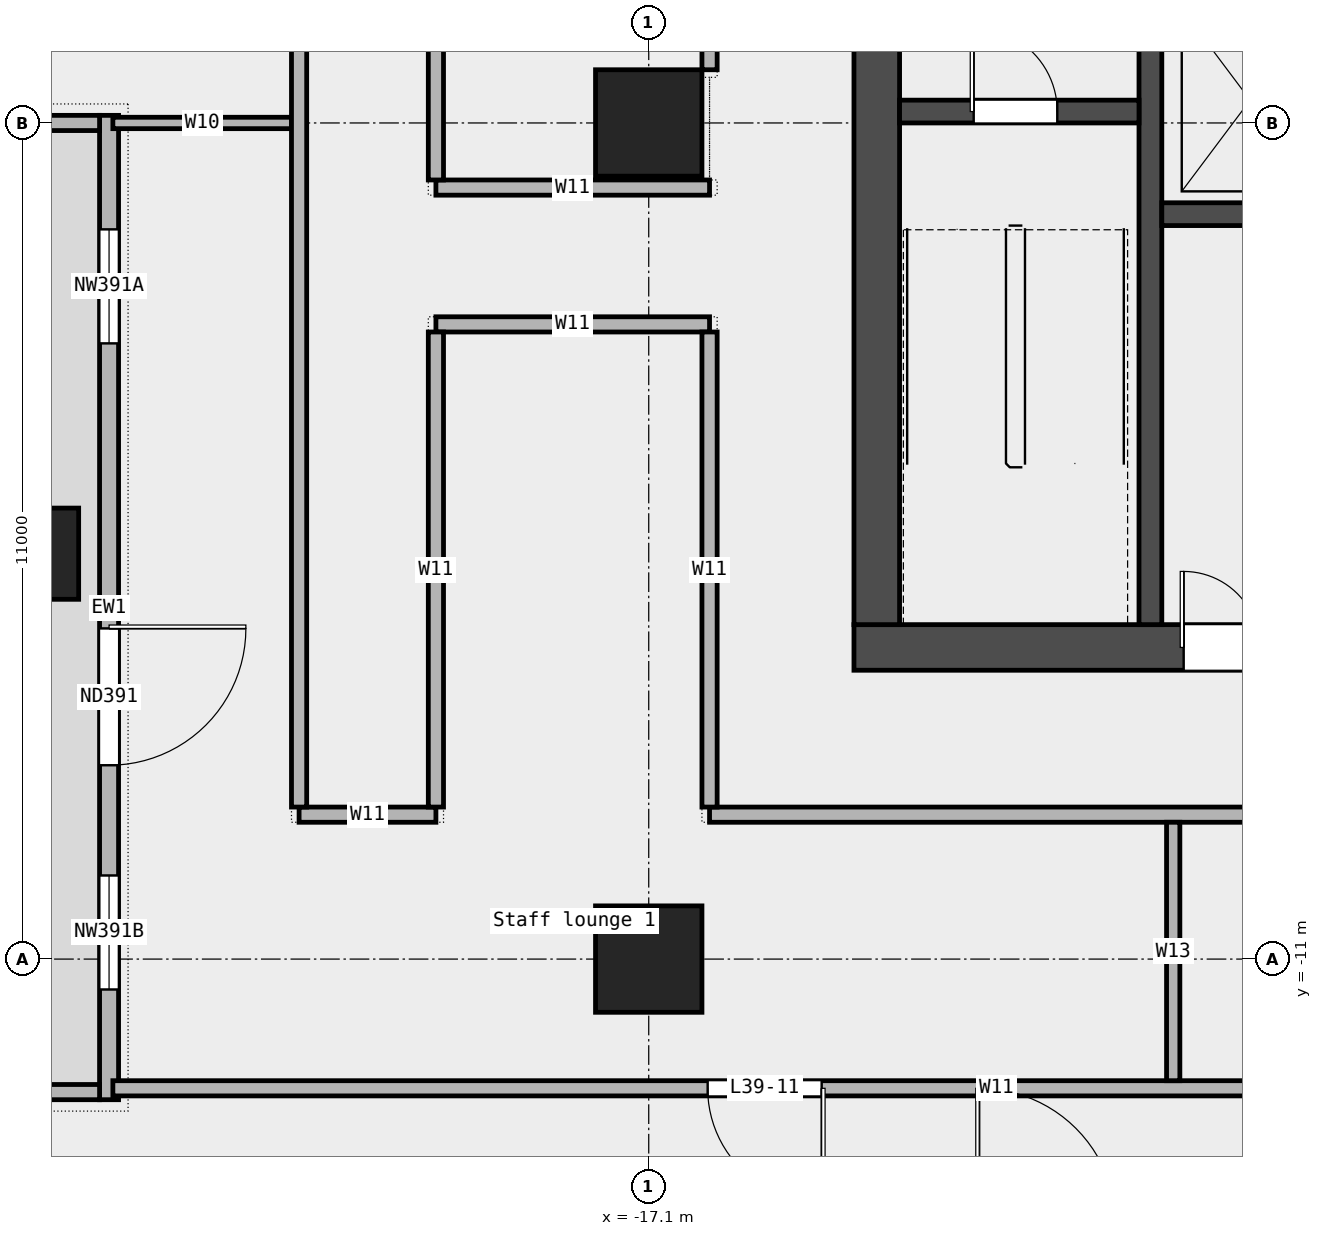
"""IFC4 building model, lengths in metres.
Left out: names, types, materials, properties, quantities, classifications, styles, units other than length and angle.
Written with IfcOpenShell. Run it as: python <this file> out.ifc"""

import sys

from ifc_helpers import new_model, si_unit, direction, frame, frame_2d, origin, origin_2d, place, context, subcontext, project, spatial, rectangle, extrude, element, fill, save


model = new_model("IFC4")
c1 = context("Model", 3, precision=1e-05, world=origin(), true_north=direction((0.0, 1.0)))
c2 = subcontext(c1, "Body", "Model", "MODEL_VIEW")
j1 = project(units=[si_unit("LENGTHUNIT", "METRE"), si_unit("PLANEANGLEUNIT", "RADIAN")], contexts=[c1])
p1 = place(None, origin())
s1 = spatial("IfcSite", under=j1, at=p1, CompositionType="ELEMENT")
p2 = place(p1, origin())
s2 = spatial("IfcBuilding", under=s1, at=p2, CompositionType="ELEMENT")
p3 = place(p2, frame((0.0, 0.0, 189.0)))
s3 = spatial("IfcBuildingStorey", under=s2, at=p3, CompositionType="ELEMENT", Elevation=189.0)
p4 = place(p3, frame((-25.2, -5.667, 0.0), z_axis=(0.0, 0.0, 1.0), x_axis=(1.0, 0.0, 0.0)))
e1 = element("IfcColumn", 1, at=p4, inside=s3, PredefinedType="COLUMN", context=c2, shape_type="SweptSolid", body=[
    extrude(rectangle(XDim=1.2, YDim=1.2, at=origin_2d()), origin(), (0.0, 0.0, 1.0), 3.6),
])
for number, where, z_axis, x_axis in (
    (2, (-17.1, -11.0, 0.0), (0.0, 0.0, 1.0), (1.0, 0.0, 0.0)),
    (3, (-17.1, 0.0, 0.0), (0.0, 0.0, 1.0), (1.0, 0.0, 0.0)),
):
    element("IfcColumn", number, at=place(p3, frame(where, z_axis=z_axis, x_axis=x_axis)), inside=s3, PredefinedType="COLUMN", context=c2, shape_type="SweptSolid", body=[
        extrude(rectangle(XDim=1.4, YDim=1.4, at=origin_2d()), origin(), (0.0, 0.0, 1.0), 3.6),
    ])
p5 = place(p3, frame((-24.2, 0.1, 0.0), z_axis=(0.0, 0.0, 1.0), x_axis=(0.0, -1.0, 0.0)))
e4 = element("IfcWall", 4, at=p5, inside=s3, PredefinedType="STANDARD", context=c2, shape_type="SweptSolid", body=[
    extrude(rectangle(XDim=12.95, YDim=0.25, at=frame_2d((6.475, 0.0))), origin(), (0.0, 0.0, 1.0), 3.6),
])
p6 = place(p5, frame((1.5, 0.0, 0.45)))
e5 = element("IfcOpeningElement", 5, at=p6, cuts=e4, PredefinedType="OPENING", context=c2, shape_type="SweptSolid", body=[
    extrude(rectangle(XDim=1.5, YDim=2.4, at=frame_2d((0.75, 1.2))), frame((0.0, 0.137, 0.0), z_axis=(0.0, -1.0, 0.0), x_axis=(1.0, 0.0, 0.0)), (0.0, 0.0, 1.0), 0.274),
])
p7 = place(p5, frame((6.75, 0.0, 0.0)))
e6 = element("IfcOpeningElement", 6, at=p7, cuts=e4, PredefinedType="OPENING", context=c2, shape_type="SweptSolid", body=[
    extrude(rectangle(XDim=1.8, YDim=2.4, at=frame_2d((0.9, 1.2))), frame((0.0, 0.137, 0.0), z_axis=(0.0, -1.0, 0.0), x_axis=(1.0, 0.0, 0.0)), (0.0, 0.0, 1.0), 0.274),
])
p8 = place(p5, frame((10.0, 0.0, 0.45)))
e7 = element("IfcOpeningElement", 7, at=p8, cuts=e4, PredefinedType="OPENING", context=c2, shape_type="SweptSolid", body=[
    extrude(rectangle(XDim=1.5, YDim=2.4, at=frame_2d((0.75, 1.2))), frame((0.0, 0.137, 0.0), z_axis=(0.0, -1.0, 0.0), x_axis=(1.0, 0.0, 0.0)), (0.0, 0.0, 1.0), 0.274),
])
for number, where, z_axis, x_axis in (
    (8, (-26.2, 0.0, 0.0), (0.0, 0.0, 1.0), (1.0, 0.0, 0.0)),
    (9, (-26.2, -12.75, 0.0), (0.0, 0.0, 1.0), (1.0, 0.0, 0.0)),
):
    element("IfcWall", number, at=place(p3, frame(where, z_axis=z_axis, x_axis=x_axis)), inside=s3, PredefinedType="STANDARD", context=c2, shape_type="SweptSolid", body=[
        extrude(rectangle(XDim=1.875, YDim=0.2, at=frame_2d((0.938, 0.0))), origin(), (0.0, 0.0, 1.0), 3.6),
    ])
p9 = place(p3, frame((-24.15, -12.7, 0.0), z_axis=(0.0, 0.0, 1.0), x_axis=(1.0, 0.0, 0.0)))
e10 = element("IfcWall", 10, at=p9, inside=s3, PredefinedType="PARTITIONING", context=c2, shape_type="SweptSolid", body=[
    extrude(rectangle(XDim=23.25, YDim=0.2, at=frame_2d((11.625, 0.0))), origin(), (0.0, 0.0, 1.0), 3.6),
])
p10 = place(p9, frame((19.35, 0.0, 0.0)))
e11 = element("IfcOpeningElement", 11, at=p10, cuts=e10, PredefinedType="OPENING", context=c2, shape_type="SweptSolid", body=[
    extrude(rectangle(XDim=0.9, YDim=2.1, at=frame_2d((0.45, 1.05))), frame((0.0, 0.112, 0.0), z_axis=(0.0, -1.0, 0.0), x_axis=(1.0, 0.0, 0.0)), (0.0, 0.0, 1.0), 0.224),
])
p11 = place(p9, frame((7.825, 0.0, 0.0)))
e12 = element("IfcOpeningElement", 12, at=p11, cuts=e10, PredefinedType="OPENING", context=c2, shape_type="SweptSolid", body=[
    extrude(rectangle(XDim=1.5, YDim=2.1, at=frame_2d((0.75, 1.05))), frame((0.0, 0.112, 0.0), z_axis=(0.0, -1.0, 0.0), x_axis=(1.0, 0.0, 0.0)), (0.0, 0.0, 1.0), 0.224),
])
p12 = place(p3, frame((-21.7, -9.1, 0.0), z_axis=(0.0, 0.0, 1.0), x_axis=(1.0, 0.0, 0.0)))
e13 = element("IfcWall", 13, at=p12, inside=s3, PredefinedType="PARTITIONING", context=c2, shape_type="SweptSolid", body=[
    extrude(rectangle(XDim=1.8, YDim=0.2, at=frame_2d((0.9, 0.0))), origin(), (0.0, 0.0, 1.0), 3.6),
])
p13 = place(p3, frame((-16.3, -9.1, 0.0), z_axis=(0.0, 0.0, 1.0), x_axis=(1.0, 0.0, 0.0)))
e14 = element("IfcWall", 14, at=p13, inside=s3, PredefinedType="PARTITIONING", context=c2, shape_type="SweptSolid", body=[
    extrude(rectangle(XDim=15.4, YDim=0.2, at=frame_2d((7.7, 0.0))), origin(), (0.0, 0.0, 1.0), 3.6),
])
for number, where, z_axis, x_axis in (
    (15, (-19.9, -2.65, 0.0), (0.0, 0.0, 1.0), (1.0, 0.0, 0.0)),
    (16, (-19.9, -0.85, 0.0), (0.0, 0.0, 1.0), (1.0, 0.0, 0.0)),
):
    element("IfcWall", number, at=place(p3, frame(where, z_axis=z_axis, x_axis=x_axis)), inside=s3, PredefinedType="PARTITIONING", context=c2, shape_type="SweptSolid", body=[
        extrude(rectangle(XDim=3.6, YDim=0.2, at=frame_2d((1.8, 0.0))), origin(), (0.0, 0.0, 1.0), 3.6),
    ])
p14 = place(p3, frame((-24.15, 0.0, 0.0), z_axis=(0.0, 0.0, 1.0), x_axis=(1.0, 0.0, 0.0)))
e17 = element("IfcWall", 17, at=p14, inside=s3, PredefinedType="PARTITIONING", context=c2, shape_type="SweptSolid", body=[
    extrude(rectangle(XDim=2.35, YDim=0.15, at=frame_2d((1.175, 0.0))), origin(), (0.0, 0.0, 1.0), 3.6),
])
p15 = place(p3, frame((-21.7, -9.0, 0.0), z_axis=(0.0, 0.0, 1.0), x_axis=(0.0, 1.0, 0.0)))
e18 = element("IfcWall", 18, at=p15, inside=s3, PredefinedType="PARTITIONING", context=c2, shape_type="SweptSolid", body=[
    extrude(rectangle(XDim=24.3, YDim=0.2, at=frame_2d((12.15, 0.0))), origin(), (0.0, 0.0, 1.0), 3.6),
])
p16 = place(p15, frame((16.05, 0.0, 0.0)))
e19 = element("IfcOpeningElement", 19, at=p16, cuts=e18, PredefinedType="OPENING", context=c2, shape_type="SweptSolid", body=[
    extrude(rectangle(XDim=1.2, YDim=2.1, at=frame_2d((0.6, 1.05))), frame((0.0, 0.112, 0.0), z_axis=(0.0, -1.0, 0.0), x_axis=(1.0, 0.0, 0.0)), (0.0, 0.0, 1.0), 0.224),
])
p17 = place(p3, frame((-19.9, -9.0, 0.0), z_axis=(0.0, 0.0, 1.0), x_axis=(0.0, 1.0, 0.0)))
e20 = element("IfcWall", 20, at=p17, inside=s3, PredefinedType="PARTITIONING", context=c2, shape_type="SweptSolid", body=[
    extrude(rectangle(XDim=6.25, YDim=0.2, at=frame_2d((3.125, 0.0))), origin(), (0.0, 0.0, 1.0), 3.6),
])
p18 = place(p3, frame((-19.9, -0.75, 0.0), z_axis=(0.0, 0.0, 1.0), x_axis=(0.0, 1.0, 0.0)))
e21 = element("IfcWall", 21, at=p18, inside=s3, PredefinedType="PARTITIONING", context=c2, shape_type="SweptSolid", body=[
    extrude(rectangle(XDim=16.05, YDim=0.2, at=frame_2d((8.025, 0.0))), origin(), (0.0, 0.0, 1.0), 3.6),
])
p19 = place(p3, frame((-16.3, -9.0, 0.0), z_axis=(0.0, 0.0, 1.0), x_axis=(0.0, 1.0, 0.0)))
e22 = element("IfcWall", 22, at=p19, inside=s3, PredefinedType="PARTITIONING", context=c2, shape_type="SweptSolid", body=[
    extrude(rectangle(XDim=6.25, YDim=0.2, at=frame_2d((3.125, 0.0))), origin(), (0.0, 0.0, 1.0), 3.6),
])
p20 = place(p3, frame((-16.3, 0.7, 0.0), z_axis=(0.0, 0.0, 1.0), x_axis=(0.0, 1.0, 0.0)))
e23 = element("IfcWall", 23, at=p20, inside=s3, PredefinedType="PARTITIONING", context=c2, shape_type="SweptSolid", body=[
    extrude(rectangle(XDim=9.6, YDim=0.2, at=frame_2d((4.8, 0.0))), origin(), (0.0, 0.0, 1.0), 3.6),
])
p21 = place(p20, frame((1.73, 0.0, 0.0)))
e24 = element("IfcOpeningElement", 24, at=p21, cuts=e23, PredefinedType="OPENING", context=c2, shape_type="SweptSolid", body=[
    extrude(rectangle(XDim=0.9, YDim=2.1, at=frame_2d((0.45, 1.05))), frame((0.0, 0.112, 0.0), z_axis=(0.0, -1.0, 0.0), x_axis=(1.0, 0.0, 0.0)), (0.0, 0.0, 1.0), 0.224),
])
p22 = place(p20, frame((6.353, 0.0, 0.0)))
e25 = element("IfcOpeningElement", 25, at=p22, cuts=e23, PredefinedType="OPENING", context=c2, shape_type="SweptSolid", body=[
    extrude(rectangle(XDim=0.9, YDim=2.1, at=frame_2d((0.45, 1.05))), frame((0.0, 0.112, 0.0), z_axis=(0.0, -1.0, 0.0), x_axis=(1.0, 0.0, 0.0)), (0.0, 0.0, 1.0), 0.224),
])
p23 = place(p3, frame((-10.2, -12.6, 0.0), z_axis=(0.0, 0.0, 1.0), x_axis=(0.0, 1.0, 0.0)))
e26 = element("IfcWall", 26, at=p23, inside=s3, PredefinedType="PARTITIONING", context=c2, shape_type="SweptSolid", body=[
    extrude(rectangle(XDim=3.4, YDim=0.175, at=frame_2d((1.7, 0.0))), origin(), (0.0, 0.0, 1.0), 3.6),
])
p24 = place(p3, frame((-14.4, -6.9, 0.0), z_axis=(0.0, 0.0, 1.0), x_axis=(1.0, 0.0, 0.0)))
e27 = element("IfcWall", 27, at=p24, inside=s3, PredefinedType="SHEAR", context=c2, shape_type="SweptSolid", body=[
    extrude(rectangle(XDim=28.8, YDim=0.6, at=frame_2d((14.4, 0.0))), origin(), (0.0, 0.0, 1.0), 3.7),
])
p25 = place(p24, frame((4.337, 0.0, 0.0)))
e28 = element("IfcOpeningElement", 28, at=p25, cuts=e27, PredefinedType="OPENING", context=c2, shape_type="SweptSolid", body=[
    extrude(rectangle(XDim=1.0, YDim=2.1, at=frame_2d((0.5, 1.05))), frame((0.0, 0.312, 0.0), z_axis=(0.0, -1.0, 0.0), x_axis=(1.0, 0.0, 0.0)), (0.0, 0.0, 1.0), 0.624),
])
p26 = place(p24, frame((8.925, 0.0, 0.0)))
e29 = element("IfcOpeningElement", 29, at=p26, cuts=e27, PredefinedType="OPENING", context=c2, shape_type="SweptSolid", body=[
    extrude(rectangle(XDim=1.2, YDim=2.1, at=frame_2d((0.6, 1.05))), frame((0.0, 0.312, 0.0), z_axis=(0.0, -1.0, 0.0), x_axis=(1.0, 0.0, 0.0)), (0.0, 0.0, 1.0), 0.624),
])
p27 = place(p24, frame((13.712, 0.0, 0.0)))
e30 = element("IfcOpeningElement", 30, at=p27, cuts=e27, PredefinedType="OPENING", context=c2, shape_type="SweptSolid", body=[
    extrude(rectangle(XDim=1.0, YDim=2.1, at=frame_2d((0.5, 1.05))), frame((0.0, 0.312, 0.0), z_axis=(0.0, -1.0, 0.0), x_axis=(1.0, 0.0, 0.0)), (0.0, 0.0, 1.0), 0.624),
])
p28 = place(p24, frame((15.587, 0.0, 0.0)))
e31 = element("IfcOpeningElement", 31, at=p28, cuts=e27, PredefinedType="OPENING", context=c2, shape_type="SweptSolid", body=[
    extrude(rectangle(XDim=1.0, YDim=2.1, at=frame_2d((0.5, 1.05))), frame((0.0, 0.312, 0.0), z_axis=(0.0, -1.0, 0.0), x_axis=(1.0, 0.0, 0.0)), (0.0, 0.0, 1.0), 0.624),
])
p29 = place(p24, frame((18.75, 0.0, 0.0)))
e32 = element("IfcOpeningElement", 32, at=p29, cuts=e27, PredefinedType="OPENING", context=c2, shape_type="SweptSolid", body=[
    extrude(rectangle(XDim=1.8, YDim=2.1, at=frame_2d((0.9, 1.05))), frame((0.0, 0.312, 0.0), z_axis=(0.0, -1.0, 0.0), x_axis=(1.0, 0.0, 0.0)), (0.0, 0.0, 1.0), 0.624),
])
p30 = place(p24, frame((23.087, 0.0, 0.0)))
e33 = element("IfcOpeningElement", 33, at=p30, cuts=e27, PredefinedType="OPENING", context=c2, shape_type="SweptSolid", body=[
    extrude(rectangle(XDim=1.0, YDim=2.1, at=frame_2d((0.5, 1.05))), frame((0.0, 0.312, 0.0), z_axis=(0.0, -1.0, 0.0), x_axis=(1.0, 0.0, 0.0)), (0.0, 0.0, 1.0), 0.624),
])
p31 = place(p3, frame((-14.1, -6.6, 0.0), z_axis=(0.0, 0.0, 1.0), x_axis=(0.0, 1.0, 0.0)))
e34 = element("IfcWall", 34, at=p31, inside=s3, PredefinedType="SHEAR", context=c2, shape_type="SweptSolid", body=[
    extrude(rectangle(XDim=19.5, YDim=0.6, at=frame_2d((9.75, 0.0))), origin(), (0.0, 0.0, 1.0), 3.7),
])
p32 = place(p31, frame((9.3, 0.0, 0.0)))
e35 = element("IfcOpeningElement", 35, at=p32, cuts=e34, PredefinedType="OPENING", context=c2, shape_type="SweptSolid", body=[
    extrude(rectangle(XDim=1.8, YDim=2.1, at=frame_2d((0.9, 1.05))), frame((0.0, 0.312, 0.0), z_axis=(0.0, -1.0, 0.0), x_axis=(1.0, 0.0, 0.0)), (0.0, 0.0, 1.0), 0.624),
])
p33 = place(p3, frame((-10.5, -6.6, 0.0), z_axis=(0.0, 0.0, 1.0), x_axis=(0.0, 1.0, 0.0)))
e36 = element("IfcWall", 36, at=p33, inside=s3, PredefinedType="SHEAR", context=c2, shape_type="SweptSolid", body=[
    extrude(rectangle(XDim=8.55, YDim=0.3, at=frame_2d((4.275, 0.0))), origin(), (0.0, 0.0, 1.0), 3.7),
])
p34 = place(p3, frame((-13.8, 0.15, 0.0), z_axis=(0.0, 0.0, 1.0), x_axis=(1.0, 0.0, 0.0)))
e37 = element("IfcWall", 37, at=p34, inside=s3, PredefinedType="SOLIDWALL", context=c2, shape_type="SweptSolid", body=[
    extrude(rectangle(XDim=3.15, YDim=0.3, at=frame_2d((1.575, 0.0))), origin(), (0.0, 0.0, 1.0), 3.7),
])
p35 = place(p34, frame((0.975, 0.0, 0.0)))
e38 = element("IfcOpeningElement", 38, at=p35, cuts=e37, PredefinedType="OPENING", context=c2, shape_type="SweptSolid", body=[
    extrude(rectangle(XDim=1.1, YDim=2.1, at=frame_2d((0.55, 1.05))), frame((0.0, 0.162, 0.0), z_axis=(0.0, -1.0, 0.0), x_axis=(1.0, 0.0, 0.0)), (0.0, 0.0, 1.0), 0.324),
])
p36 = place(p3, frame((-10.35, -1.2, 0.0), z_axis=(0.0, 0.0, 1.0), x_axis=(1.0, 0.0, 0.0)))
e39 = element("IfcWall", 39, at=p36, inside=s3, PredefinedType="SOLIDWALL", context=c2, shape_type="SweptSolid", body=[
    extrude(rectangle(XDim=20.7, YDim=0.3, at=frame_2d((10.35, 0.0))), origin(), (0.0, 0.0, 1.0), 3.7),
])
p37 = place(p6, origin())
e40 = element("IfcWindow", 40, at=p37, inside=s3, PartitioningType="SINGLE_PANEL", PredefinedType="WINDOW", context=c2, shape_type="SweptSolid", body=[
    extrude(rectangle(XDim=1.5, YDim=2.4, at=frame_2d((0.75, 1.2))), frame((0.0, 0.03, 0.0), z_axis=(0.0, -1.0, 0.0), x_axis=(1.0, 0.0, 0.0)), (0.0, 0.0, 1.0), 0.06),
])
fill(e5, e40)
p38 = place(p7, origin())
e41 = element("IfcDoor", 41, at=p38, inside=s3, OperationType="DOUBLE_DOOR_SINGLE_SWING", PredefinedType="DOOR", context=c2, shape_type="SweptSolid", body=[
    extrude(rectangle(XDim=1.8, YDim=2.4, at=frame_2d((0.9, 1.2))), frame((0.0, 0.025, 0.0), z_axis=(0.0, -1.0, 0.0), x_axis=(1.0, 0.0, 0.0)), (0.0, 0.0, 1.0), 0.05),
])
fill(e6, e41)
p39 = place(p8, origin())
e42 = element("IfcWindow", 42, at=p39, inside=s3, PartitioningType="SINGLE_PANEL", PredefinedType="WINDOW", context=c2, shape_type="SweptSolid", body=[
    extrude(rectangle(XDim=1.5, YDim=2.4, at=frame_2d((0.75, 1.2))), frame((0.0, 0.03, 0.0), z_axis=(0.0, -1.0, 0.0), x_axis=(1.0, 0.0, 0.0)), (0.0, 0.0, 1.0), 0.06),
])
fill(e7, e42)
p40 = place(p11, origin())
e43 = element("IfcDoor", 43, at=p40, inside=s3, OperationType="DOUBLE_DOOR_SINGLE_SWING", PredefinedType="DOOR", context=c2, shape_type="SweptSolid", body=[
    extrude(rectangle(XDim=1.5, YDim=2.1, at=frame_2d((0.75, 1.05))), frame((0.0, 0.025, 0.0), z_axis=(0.0, -1.0, 0.0), x_axis=(1.0, 0.0, 0.0)), (0.0, 0.0, 1.0), 0.05),
])
fill(e12, e43)
p41 = place(p35, origin())
e44 = element("IfcDoor", 44, at=p41, inside=s3, OperationType="SINGLE_SWING_LEFT", PredefinedType="DOOR", context=c2, shape_type="SweptSolid", body=[
    extrude(rectangle(XDim=1.1, YDim=2.1, at=frame_2d((0.55, 1.05))), frame((0.0, 0.025, 0.0), z_axis=(0.0, -1.0, 0.0), x_axis=(1.0, 0.0, 0.0)), (0.0, 0.0, 1.0), 0.05),
])
fill(e38, e44)
p42 = place(p25, origin())
e45 = element("IfcDoor", 45, at=p42, inside=s3, OperationType="SINGLE_SWING_LEFT", PredefinedType="DOOR", context=c2, shape_type="SweptSolid", body=[
    extrude(rectangle(XDim=1.0, YDim=2.1, at=frame_2d((0.5, 1.05))), frame((0.0, 0.025, 0.0), z_axis=(0.0, -1.0, 0.0), x_axis=(1.0, 0.0, 0.0)), (0.0, 0.0, 1.0), 0.05),
])
fill(e28, e45)
save(model, sys.argv[1])
